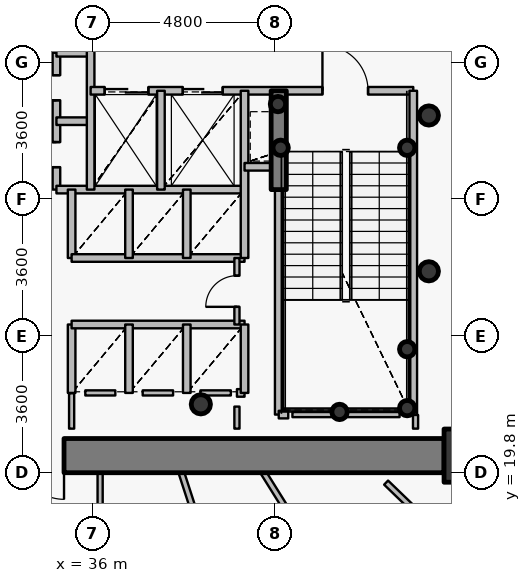
"""IFC4 building model, lengths in metres.
Left out: names, types, materials, properties, quantities, classifications, styles, units other than length and angle.
Written with IfcOpenShell. Run it as: python <this file> out.ifc"""

import sys

from ifc_helpers import new_model, si_unit, direction, frame, frame_2d, origin, origin_2d, place, context, subcontext, project, spatial, rectangle, hollow_circle, extrude, source, transform, mapped, element, fill, save


model = new_model("IFC4")
c1 = context("Model", 3, precision=1e-05, world=origin(), true_north=direction((0.0, 1.0)))
c2 = subcontext(c1, "Body", "Model", "MODEL_VIEW")
j1 = project(units=[si_unit("LENGTHUNIT", "METRE"), si_unit("PLANEANGLEUNIT", "RADIAN")], contexts=[c1])
p1 = place(None, origin())
s1 = spatial("IfcSite", under=j1, at=p1, CompositionType="ELEMENT")
p2 = place(p1, origin())
s2 = spatial("IfcBuilding", under=s1, at=p2, CompositionType="ELEMENT")
p3 = place(p2, frame((0.0, 0.0, 6.0)))
s3 = spatial("IfcBuildingStorey", under=s2, at=p3, CompositionType="ELEMENT", Elevation=6.0)
p4 = place(p3, frame((45.95, 20.25, 0.0), z_axis=(0.0, 0.0, 1.0), x_axis=(1.0, 0.0, 0.0)))
e1 = element("IfcColumn", 1, at=p4, inside=s3, PredefinedType="COLUMN", context=c2, shape_type="SweptSolid", body=[
    extrude(rectangle(XDim=1.4, YDim=1.4, at=origin_2d()), origin(), (0.0, 0.0, 1.0), 4.2),
])
p5 = place(p3, frame((38.85, 21.6, 0.0), z_axis=(0.0, 0.0, 1.0), x_axis=(1.0, 0.0, 0.0)))
e2 = element("IfcColumn", 2, at=p5, inside=s3, PredefinedType="COLUMN", context=c2, shape_type="SweptSolid", body=[
    extrude(hollow_circle(Radius=0.254, WallThickness=0.02, at=origin_2d()), origin(), (0.0, 0.0, 1.0), 4.2),
])
for number, where, z_axis, x_axis in (
    (3, (44.28, 21.5, 0.0), (0.0, 0.0, 1.0), (1.0, 0.0, 0.0)),
    (4, (44.28, 23.05, 0.0), (0.0, 0.0, 1.0), (1.0, 0.0, 0.0)),
    (5, (42.5, 21.4, 0.0), (0.0, 0.0, 1.0), (1.0, 0.0, 0.0)),
    (6, (40.95, 28.35, 0.0), (0.0, 0.0, 1.0), (1.0, 0.0, 0.0)),
    (7, (44.28, 28.35, 0.0), (0.0, 0.0, 1.0), (1.0, 0.0, 0.0)),
    (8, (40.88, 29.5, 0.0), (0.0, 0.0, 1.0), (1.0, 0.0, 0.0)),
):
    element("IfcColumn", number, at=place(p3, frame(where, z_axis=z_axis, x_axis=x_axis)), inside=s3, PredefinedType="COLUMN", context=c2, shape_type="SweptSolid", body=[
        extrude(hollow_circle(Radius=0.203, WallThickness=0.016, at=origin_2d()), origin(), (0.0, 0.0, 1.0), 4.2),
    ])
p6 = place(p3, frame((45.25, 20.25, 0.0), z_axis=(0.0, 0.0, 1.0), x_axis=(-1.0, 0.0, 0.0)))
e9 = element("IfcWall", 9, at=p6, inside=s3, PredefinedType="SHEAR", context=c2, shape_type="SweptSolid", body=[
    extrude(rectangle(XDim=18.5, YDim=0.9, at=frame_2d((9.25, 0.0))), origin(), (0.0, 0.0, 1.0), 3.35),
])
p7 = place(p6, frame((10.0, 0.0, 0.0)))
e10 = element("IfcOpeningElement", 10, at=p7, cuts=e9, PredefinedType="OPENING", context=c2, shape_type="SweptSolid", body=[
    extrude(rectangle(XDim=1.15, YDim=2.15, at=origin_2d()), frame((0.575, 0.46, 1.075), z_axis=(0.0, -1.0, 0.0), x_axis=(1.0, 0.0, 0.0)), (0.0, 0.0, 1.0), 0.92),
])
p8 = place(p3, frame((40.9, 27.25, 0.0), z_axis=(0.0, 0.0, 1.0), x_axis=(0.0, 1.0, 0.0)))
e11 = element("IfcWall", 11, at=p8, inside=s3, PredefinedType="SHEAR", context=c2, shape_type="SweptSolid", body=[
    extrude(rectangle(XDim=2.6, YDim=0.4, at=frame_2d((1.3, 0.0))), origin(), (0.0, 0.0, 1.0), 3.5),
])
for number, where, z_axis, x_axis in (
    (12, (44.85, 25.1, 0.0), (0.0, 0.0, 1.0), (1.0, 0.0, 0.0)),
    (13, (44.85, 29.2, 0.0), (0.0, 0.0, 1.0), (1.0, 0.0, 0.0)),
):
    element("IfcColumn", number, at=place(p3, frame(where, z_axis=z_axis, x_axis=x_axis)), inside=s3, PredefinedType="COLUMN", context=c2, shape_type="SweptSolid", body=[
        extrude(hollow_circle(Radius=0.254, WallThickness=0.02, at=origin_2d()), origin(), (0.0, 0.0, 1.0), 4.2),
    ])
p9 = place(p3, frame((35.05, 27.25, 0.0), z_axis=(0.0, 0.0, 1.0), x_axis=(0.0, 1.0, 0.0)))
e14 = element("IfcWall", 14, at=p9, inside=s3, PredefinedType="PARTITIONING", context=c2, shape_type="SweptSolid", body=[
    extrude(rectangle(XDim=3.6, YDim=0.2, at=frame_2d((1.8, 0.0))), origin(), (0.0, 0.0, 1.0), 3.9),
])
p10 = place(p9, frame((0.59, 0.0, 0.0)))
e15 = element("IfcOpeningElement", 15, at=p10, cuts=e14, PredefinedType="OPENING", context=c2, shape_type="SweptSolid", body=[
    extrude(rectangle(XDim=0.66, YDim=2.05, at=origin_2d()), frame((0.33, 0.11, 1.025), z_axis=(0.0, -1.0, 0.0), x_axis=(1.0, 0.0, 0.0)), (0.0, 0.0, 1.0), 0.22),
])
p11 = place(p9, frame((2.35, 0.0, 0.0)))
e16 = element("IfcOpeningElement", 16, at=p11, cuts=e14, PredefinedType="OPENING", context=c2, shape_type="SweptSolid", body=[
    extrude(rectangle(XDim=0.66, YDim=2.05, at=origin_2d()), frame((0.33, 0.11, 1.025), z_axis=(0.0, -1.0, 0.0), x_axis=(1.0, 0.0, 0.0)), (0.0, 0.0, 1.0), 0.22),
])
p12 = place(p3, frame((35.05, 27.25, 0.0), z_axis=(0.0, 0.0, 1.0), x_axis=(1.0, 0.0, 0.0)))
e17 = element("IfcWall", 17, at=p12, inside=s3, PredefinedType="PARTITIONING", context=c2, shape_type="SweptSolid", body=[
    extrude(rectangle(XDim=4.95, YDim=0.2, at=frame_2d((2.475, 0.0))), origin(), (0.0, 0.0, 1.0), 3.485),
])
for number, where, z_axis, x_axis in (
    (18, (35.05, 29.05, 0.0), (0.0, 0.0, 1.0), (1.0, 0.0, 0.0)),
    (19, (35.05, 30.85, 0.0), (0.0, 0.0, 1.0), (1.0, 0.0, 0.0)),
):
    element("IfcWall", number, at=place(p3, frame(where, z_axis=z_axis, x_axis=x_axis)), inside=s3, PredefinedType="PARTITIONING", context=c2, shape_type="SweptSolid", body=[
        extrude(rectangle(XDim=0.9, YDim=0.2, at=frame_2d((0.45, 0.0))), origin(), (0.0, 0.0, 1.0), 3.9),
    ])
p13 = place(p3, frame((35.45, 21.9, 0.0), z_axis=(0.0, 0.0, 1.0), x_axis=(0.0, 1.0, 0.0)))
e20 = element("IfcWall", 20, at=p13, inside=s3, PredefinedType="PARTITIONING", context=c2, shape_type="SweptSolid", body=[
    extrude(rectangle(XDim=1.8, YDim=0.2, at=frame_2d((0.9, 0.0))), origin(), (0.0, 0.0, 1.0), 3.9),
])
p14 = place(p3, frame((35.45, 23.7, 0.0), z_axis=(0.0, 0.0, 1.0), x_axis=(1.0, 0.0, 0.0)))
e21 = element("IfcWall", 21, at=p14, inside=s3, PredefinedType="PARTITIONING", context=c2, shape_type="SweptSolid", body=[
    extrude(rectangle(XDim=4.55, YDim=0.2, at=frame_2d((2.275, 0.0))), origin(), (0.0, 0.0, 1.0), 3.485),
])
p15 = place(p3, frame((35.45, 25.45, 0.0), z_axis=(0.0, 0.0, 1.0), x_axis=(0.0, 1.0, 0.0)))
e22 = element("IfcWall", 22, at=p15, inside=s3, PredefinedType="PARTITIONING", context=c2, shape_type="SweptSolid", body=[
    extrude(rectangle(XDim=1.8, YDim=0.2, at=frame_2d((0.9, 0.0))), origin(), (0.0, 0.0, 1.0), 3.9),
])
p16 = place(p3, frame((35.45, 25.45, 0.0), z_axis=(0.0, 0.0, 1.0), x_axis=(1.0, 0.0, 0.0)))
e23 = element("IfcWall", 23, at=p16, inside=s3, PredefinedType="PARTITIONING", context=c2, shape_type="SweptSolid", body=[
    extrude(rectangle(XDim=4.55, YDim=0.2, at=frame_2d((2.275, 0.0))), origin(), (0.0, 0.0, 1.0), 3.485),
])
p17 = place(p3, frame((35.95, 27.25, 0.0), z_axis=(0.0, 0.0, 1.0), x_axis=(0.0, 1.0, 0.0)))
e24 = element("IfcWall", 24, at=p17, inside=s3, PredefinedType="PARTITIONING", context=c2, shape_type="SweptSolid", body=[
    extrude(rectangle(XDim=3.8, YDim=0.2, at=frame_2d((1.9, 0.0))), origin(), (0.0, 0.0, 1.0), 3.9),
])
p18 = place(p3, frame((35.95, 29.85, 0.0), z_axis=(0.0, 0.0, 1.0), x_axis=(1.0, 0.0, 0.0)))
e25 = element("IfcWall", 25, at=p18, inside=s3, PredefinedType="PARTITIONING", context=c2, shape_type="SweptSolid", body=[
    extrude(rectangle(XDim=8.49, YDim=0.2, at=frame_2d((4.245, 0.0))), origin(), (0.0, 0.0, 1.0), 3.485),
])
p19 = place(p18, frame((6.1, 0.0, 0.0)))
e26 = element("IfcOpeningElement", 26, at=p19, cuts=e25, PredefinedType="OPENING", context=c2, shape_type="SweptSolid", body=[
    extrude(rectangle(XDim=1.2, YDim=2.15, at=origin_2d()), frame((0.6, 0.11, 1.075), z_axis=(0.0, -1.0, 0.0), x_axis=(1.0, 0.0, 0.0)), (0.0, 0.0, 1.0), 0.22),
])
p20 = place(p18, frame((0.37, 0.0, 0.0)))
e27 = element("IfcOpeningElement", 27, at=p20, cuts=e25, PredefinedType="OPENING", context=c2, shape_type="SweptSolid", body=[
    extrude(rectangle(XDim=1.15, YDim=2.15, at=origin_2d()), frame((0.575, 0.11, 1.075), z_axis=(0.0, -1.0, 0.0), x_axis=(1.0, 0.0, 0.0)), (0.0, 0.0, 1.0), 0.22),
])
p21 = place(p18, frame((2.425, 0.0, 0.0)))
e28 = element("IfcOpeningElement", 28, at=p21, cuts=e25, PredefinedType="OPENING", context=c2, shape_type="SweptSolid", body=[
    extrude(rectangle(XDim=1.05, YDim=2.15, at=origin_2d()), frame((0.525, 0.11, 1.075), z_axis=(0.0, -1.0, 0.0), x_axis=(1.0, 0.0, 0.0)), (0.0, 0.0, 1.0), 0.22),
])
p22 = place(p3, frame((36.2, 17.9, 0.0), z_axis=(0.0, 0.0, 1.0), x_axis=(0.0, 1.0, 0.0)))
e29 = element("IfcWall", 29, at=p22, inside=s3, PredefinedType="PARTITIONING", context=c2, shape_type="SweptSolid", body=[
    extrude(rectangle(XDim=1.9, YDim=0.135, at=frame_2d((0.95, 0.0))), origin(), (0.0, 0.0, 1.0), 3.085),
])
for number, where, z_axis, x_axis in (
    (30, (36.96, 21.9, 0.0), (0.0, 0.0, 1.0), (0.0, 1.0, 0.0)),
    (31, (36.96, 25.45, 0.0), (0.0, 0.0, 1.0), (0.0, 1.0, 0.0)),
):
    element("IfcWall", number, at=place(p3, frame(where, z_axis=z_axis, x_axis=x_axis)), inside=s3, PredefinedType="PARTITIONING", context=c2, shape_type="SweptSolid", body=[
        extrude(rectangle(XDim=1.8, YDim=0.2, at=frame_2d((0.9, 0.0))), origin(), (0.0, 0.0, 1.0), 3.9),
    ])
p23 = place(p3, frame((37.8, 27.25, 0.0), z_axis=(0.0, 0.0, 1.0), x_axis=(0.0, 1.0, 0.0)))
e32 = element("IfcWall", 32, at=p23, inside=s3, PredefinedType="PARTITIONING", context=c2, shape_type="SweptSolid", body=[
    extrude(rectangle(XDim=2.6, YDim=0.2, at=frame_2d((1.3, 0.0))), origin(), (0.0, 0.0, 1.0), 3.9),
])
p24 = place(p3, frame((38.339, 19.8, 0.0), z_axis=(0.0, 0.0, 1.0), x_axis=(0.309020911431, -0.951055243557, 0.0)))
e33 = element("IfcWall", 33, at=p24, inside=s3, PredefinedType="PARTITIONING", context=c2, shape_type="SweptSolid", body=[
    extrude(rectangle(XDim=18.723, YDim=0.15, at=frame_2d((9.362, 0.0))), origin(), (0.0, 0.0, 1.0), 3.285),
])
p25 = place(p24, frame((4.76, 0.0, 0.0)))
e34 = element("IfcOpeningElement", 34, at=p25, cuts=e33, PredefinedType="OPENING", context=c2, shape_type="SweptSolid", body=[
    extrude(rectangle(XDim=0.82, YDim=2.1, at=origin_2d()), frame((0.41, 0.085, 1.05), z_axis=(0.0, -1.0, 0.0), x_axis=(1.0, 0.0, 0.0)), (0.0, 0.0, 1.0), 0.17),
])
p26 = place(p24, frame((13.966, 0.0, 0.0)))
e35 = element("IfcOpeningElement", 35, at=p26, cuts=e33, PredefinedType="OPENING", context=c2, shape_type="SweptSolid", body=[
    extrude(rectangle(XDim=1.05, YDim=2.15, at=origin_2d()), frame((0.525, 0.085, 1.075), z_axis=(0.0, -1.0, 0.0), x_axis=(1.0, 0.0, 0.0)), (0.0, 0.0, 1.0), 0.17),
])
for number, where, z_axis, x_axis in (
    (36, (38.48, 21.9, 0.0), (0.0, 0.0, 1.0), (0.0, 1.0, 0.0)),
    (37, (38.48, 25.45, 0.0), (0.0, 0.0, 1.0), (0.0, 1.0, 0.0)),
):
    element("IfcWall", number, at=place(p3, frame(where, z_axis=z_axis, x_axis=x_axis)), inside=s3, PredefinedType="PARTITIONING", context=c2, shape_type="SweptSolid", body=[
        extrude(rectangle(XDim=1.8, YDim=0.2, at=frame_2d((0.9, 0.0))), origin(), (0.0, 0.0, 1.0), 3.9),
    ])
p27 = place(p3, frame((39.8, 21.9, 0.0), z_axis=(0.0, 0.0, 1.0), x_axis=(1.0, 0.0, 0.0)))
e38 = element("IfcWall", 38, at=p27, inside=s3, PredefinedType="PARTITIONING", context=c2, shape_type="SweptSolid", body=[
    extrude(rectangle(XDim=0.2, YDim=0.2, at=frame_2d((0.1, 0.0))), origin(), (0.0, 0.0, 1.0), 3.9),
])
p28 = place(p3, frame((39.8, 23.7, 0.0), z_axis=(0.0, 0.0, 1.0), x_axis=(0.0, 1.0, 0.0)))
e39 = element("IfcWall", 39, at=p28, inside=s3, PredefinedType="PARTITIONING", context=c2, shape_type="SweptSolid", body=[
    extrude(rectangle(XDim=1.75, YDim=0.135, at=frame_2d((0.875, 0.0))), origin(), (0.0, 0.0, 1.0), 3.9),
])
p29 = place(p28, frame((0.465, 0.0, 0.0)))
e40 = element("IfcOpeningElement", 40, at=p29, cuts=e39, PredefinedType="OPENING", context=c2, shape_type="SweptSolid", body=[
    extrude(rectangle(XDim=0.82, YDim=2.1, at=origin_2d()), frame((0.41, 0.078, 1.05), z_axis=(0.0, -1.0, 0.0), x_axis=(1.0, 0.0, 0.0)), (0.0, 0.0, 1.0), 0.155),
])
p30 = place(p3, frame((40.0, 21.9, 0.0), z_axis=(0.0, 0.0, 1.0), x_axis=(0.0, 1.0, 0.0)))
e41 = element("IfcWall", 41, at=p30, inside=s3, PredefinedType="PARTITIONING", context=c2, shape_type="SweptSolid", body=[
    extrude(rectangle(XDim=1.8, YDim=0.2, at=frame_2d((0.9, 0.0))), origin(), (0.0, 0.0, 1.0), 3.9),
])
p31 = place(p3, frame((40.0, 25.45, 0.0), z_axis=(0.0, 0.0, 1.0), x_axis=(0.0, 1.0, 0.0)))
e42 = element("IfcWall", 42, at=p31, inside=s3, PredefinedType="PARTITIONING", context=c2, shape_type="SweptSolid", body=[
    extrude(rectangle(XDim=4.4, YDim=0.2, at=frame_2d((2.2, 0.0))), origin(), (0.0, 0.0, 1.0), 3.9),
])
p32 = place(p3, frame((40.0, 27.85, 0.0), z_axis=(0.0, 0.0, 1.0), x_axis=(1.0, 0.0, 0.0)))
e43 = element("IfcWall", 43, at=p32, inside=s3, PredefinedType="PARTITIONING", context=c2, shape_type="SweptSolid", body=[
    extrude(rectangle(XDim=0.9, YDim=0.2, at=frame_2d((0.45, 0.0))), origin(), (0.0, 0.0, 1.0), 3.9),
])
p33 = place(p3, frame((40.499, 19.8, 0.0), z_axis=(0.0, 0.0, 1.0), x_axis=(0.529919953547, -0.848047665425, 0.0)))
e44 = element("IfcWall", 44, at=p33, inside=s3, PredefinedType="PARTITIONING", context=c2, shape_type="SweptSolid", body=[
    extrude(rectangle(XDim=18.893, YDim=0.15, at=frame_2d((9.447, 0.0))), origin(), (0.0, 0.0, 1.0), 3.285),
])
p34 = place(p33, frame((13.906, 0.0, 0.0)))
e45 = element("IfcOpeningElement", 45, at=p34, cuts=e44, PredefinedType="OPENING", context=c2, shape_type="SweptSolid", body=[
    extrude(rectangle(XDim=1.05, YDim=2.15, at=origin_2d()), frame((0.525, 0.085, 1.075), z_axis=(0.0, -1.0, 0.0), x_axis=(1.0, 0.0, 0.0)), (0.0, 0.0, 1.0), 0.17),
])
p35 = place(p3, frame((40.9, 21.33, 0.0), z_axis=(0.0, 0.0, 1.0), x_axis=(0.0, 1.0, 0.0)))
e46 = element("IfcWall", 46, at=p35, inside=s3, PredefinedType="PARTITIONING", context=c2, shape_type="SweptSolid", body=[
    extrude(rectangle(XDim=5.91, YDim=0.2, at=frame_2d((2.955, 0.0))), origin(), (0.0, 0.0, 1.0), 3.435),
])
p36 = place(p3, frame((40.9, 21.33, 0.0), z_axis=(0.0, 0.0, 1.0), x_axis=(1.0, 0.0, 0.0)))
e47 = element("IfcWall", 47, at=p36, inside=s3, PredefinedType="PARTITIONING", context=c2, shape_type="SweptSolid", body=[
    extrude(rectangle(XDim=0.25, YDim=0.2, at=frame_2d((0.125, 0.0))), origin(), (0.0, 0.0, 1.0), 3.435),
])
p37 = place(p3, frame((44.44, 21.33, 0.0), z_axis=(0.0, 0.0, 1.0), x_axis=(0.0, 1.0, 0.0)))
e48 = element("IfcWall", 48, at=p37, inside=s3, PredefinedType="PARTITIONING", context=c2, shape_type="SweptSolid", body=[
    extrude(rectangle(XDim=8.52, YDim=0.2, at=frame_2d((4.26, 0.0))), origin(), (0.0, 0.0, 1.0), 3.9),
])
p38 = place(p3, frame((44.08, 21.33, 0.0), z_axis=(0.0, 0.0, 1.0), x_axis=(-1.0, 0.0, 0.0)))
e49 = element("IfcWall", 49, at=p38, inside=s3, PredefinedType="PARTITIONING", context=c2, shape_type="SweptSolid", body=[
    extrude(rectangle(XDim=2.82, YDim=0.135, at=frame_2d((1.41, 0.0))), origin(), (0.0, 0.0, 1.0), 3.435),
])
p39 = place(p3, frame((36.6, 21.9, 0.0), z_axis=(0.0, 0.0, 1.0), x_axis=(-1.0, 0.0, 0.0)))
e50 = element("IfcWall", 50, at=p39, inside=s3, PredefinedType="PARTITIONING", context=c2, shape_type="SweptSolid", body=[
    extrude(rectangle(XDim=0.79, YDim=0.135, at=frame_2d((0.395, 0.0))), origin(), (0.0, 0.0, 1.0), 3.9),
])
p40 = place(p3, frame((38.12, 21.9, 0.0), z_axis=(0.0, 0.0, 1.0), x_axis=(-1.0, 0.0, 0.0)))
e51 = element("IfcWall", 51, at=p40, inside=s3, PredefinedType="PARTITIONING", context=c2, shape_type="SweptSolid", body=[
    extrude(rectangle(XDim=0.8, YDim=0.135, at=frame_2d((0.4, 0.0))), origin(), (0.0, 0.0, 1.0), 3.9),
])
p41 = place(p3, frame((39.64, 21.9, 0.0), z_axis=(0.0, 0.0, 1.0), x_axis=(-1.0, 0.0, 0.0)))
e52 = element("IfcWall", 52, at=p41, inside=s3, PredefinedType="PARTITIONING", context=c2, shape_type="SweptSolid", body=[
    extrude(rectangle(XDim=0.8, YDim=0.135, at=frame_2d((0.4, 0.0))), origin(), (0.0, 0.0, 1.0), 3.485),
])
p42 = place(p3, frame((39.8, 20.96, 0.0), z_axis=(0.0, 0.0, 1.0), x_axis=(0.0, 1.0, 0.0)))
e53 = element("IfcWall", 53, at=p42, inside=s3, PredefinedType="PARTITIONING", context=c2, shape_type="SweptSolid", body=[
    extrude(rectangle(XDim=0.58, YDim=0.135, at=frame_2d((0.29, 0.0))), origin(), (0.0, 0.0, 1.0), 3.435),
])
p43 = place(p3, frame((44.5, 20.96, 0.0), z_axis=(0.0, 0.0, 1.0), x_axis=(0.0, 1.0, 0.0)))
e54 = element("IfcWall", 54, at=p43, inside=s3, PredefinedType="PARTITIONING", context=c2, shape_type="SweptSolid", body=[
    extrude(rectangle(XDim=0.36, YDim=0.135, at=frame_2d((0.18, 0.0))), origin(), (0.0, 0.0, 1.0), 3.9),
])
p44 = place(p3, frame((35.45, 21.89, 0.0), z_axis=(0.0, 0.0, 1.0), x_axis=(0.0, -1.0, 0.0)))
e55 = element("IfcWall", 55, at=p44, inside=s3, PredefinedType="PARTITIONING", context=c2, shape_type="SweptSolid", body=[
    extrude(rectangle(XDim=0.93, YDim=0.135, at=frame_2d((0.465, 0.0))), origin(), (0.0, 0.0, 1.0), 3.485),
])
p45 = place(p3, frame((43.725, 19.54, 0.0), z_axis=(0.0, 0.0, 1.0), x_axis=(0.719317456081, -0.69468150787, 0.0)))
e56 = element("IfcWall", 56, at=p45, inside=s3, PredefinedType="PARTITIONING", context=c2, shape_type="SweptSolid", body=[
    extrude(rectangle(XDim=2.804, YDim=0.15, at=frame_2d((1.402, 0.0))), origin(), (0.0, 0.0, 1.0), 3.9),
])
m1 = source(origin(), c2, "Body", "SweptSolid", [
    extrude(rectangle(XDim=1.15, YDim=2.15, at=origin_2d()), frame((0.575, 0.025, 1.075), z_axis=(0.0, -1.0, 0.0), x_axis=(1.0, 0.0, 0.0)), (0.0, 0.0, 1.0), 0.05),
])
p46 = place(p7, origin())
e57 = element("IfcDoor", 57, at=p46, inside=s3, OperationType="SINGLE_SWING_LEFT", PredefinedType="DOOR", context=c2, shape_type="MappedRepresentation", body=[
    mapped(m1, transform((0.0, 0.0, 0.0), x_axis=(1.0, 0.0, 0.0), y_axis=(0.0, 1.0, 0.0), z_axis=(0.0, 0.0, 1.0), scale=1.0)),
])
fill(e10, e57)
m2 = source(origin(), c2, "Body", "SweptSolid", [
    extrude(rectangle(XDim=1.2, YDim=2.15, at=origin_2d()), frame((0.6, 0.025, 1.075), z_axis=(0.0, -1.0, 0.0), x_axis=(1.0, 0.0, 0.0)), (0.0, 0.0, 1.0), 0.05),
])
p47 = place(p19, origin())
e58 = element("IfcDoor", 58, at=p47, inside=s3, OperationType="SINGLE_SWING_LEFT", PredefinedType="DOOR", context=c2, shape_type="MappedRepresentation", body=[
    mapped(m2, transform((0.0, 0.0, 0.0), x_axis=(1.0, 0.0, 0.0), y_axis=(0.0, 1.0, 0.0), z_axis=(0.0, 0.0, 1.0), scale=1.0)),
])
fill(e26, e58)
m3 = source(origin(), c2, "Body", "SweptSolid", [
    extrude(rectangle(XDim=1.15, YDim=2.15, at=origin_2d()), frame((0.575, 0.025, 1.075), z_axis=(0.0, -1.0, 0.0), x_axis=(1.0, 0.0, 0.0)), (0.0, 0.0, 1.0), 0.05),
])
p48 = place(p20, origin())
e59 = element("IfcDoor", 59, at=p48, inside=s3, OperationType="DOUBLE_DOOR_SLIDING", PredefinedType="USERDEFINED", context=c2, shape_type="MappedRepresentation", body=[
    mapped(m3, transform((0.0, 0.0, 0.0), x_axis=(1.0, 0.0, 0.0), y_axis=(0.0, 1.0, 0.0), z_axis=(0.0, 0.0, 1.0), scale=1.0)),
])
fill(e27, e59)
m4 = source(origin(), c2, "Body", "SweptSolid", [
    extrude(rectangle(XDim=1.05, YDim=2.15, at=origin_2d()), frame((0.525, 0.025, 1.075), z_axis=(0.0, -1.0, 0.0), x_axis=(1.0, 0.0, 0.0)), (0.0, 0.0, 1.0), 0.05),
])
p49 = place(p21, origin())
e60 = element("IfcDoor", 60, at=p49, inside=s3, OperationType="DOUBLE_DOOR_SLIDING", PredefinedType="USERDEFINED", context=c2, shape_type="MappedRepresentation", body=[
    mapped(m4, transform((0.0, 0.0, 0.0), x_axis=(1.0, 0.0, 0.0), y_axis=(0.0, 1.0, 0.0), z_axis=(0.0, 0.0, 1.0), scale=1.0)),
])
fill(e28, e60)
m5 = source(origin(), c2, "Body", "SweptSolid", [
    extrude(rectangle(XDim=0.66, YDim=2.05, at=origin_2d()), frame((0.33, 0.025, 1.025), z_axis=(0.0, -1.0, 0.0), x_axis=(1.0, 0.0, 0.0)), (0.0, 0.0, 1.0), 0.05),
])
p50 = place(p10, origin())
e61 = element("IfcDoor", 61, at=p50, inside=s3, OperationType="SINGLE_SWING_RIGHT", PredefinedType="USERDEFINED", context=c2, shape_type="MappedRepresentation", body=[
    mapped(m5, transform((0.0, 0.0, 0.0), x_axis=(1.0, 0.0, 0.0), y_axis=(0.0, 1.0, 0.0), z_axis=(0.0, 0.0, 1.0), scale=1.0)),
])
fill(e15, e61)
p51 = place(p11, origin())
e62 = element("IfcDoor", 62, at=p51, inside=s3, OperationType="SINGLE_SWING_LEFT", PredefinedType="USERDEFINED", context=c2, shape_type="MappedRepresentation", body=[
    mapped(m5, transform((0.0, 0.0, 0.0), x_axis=(1.0, 0.0, 0.0), y_axis=(0.0, 1.0, 0.0), z_axis=(0.0, 0.0, 1.0), scale=1.0)),
])
fill(e16, e62)
m6 = source(origin(), c2, "Body", "SweptSolid", [
    extrude(rectangle(XDim=0.82, YDim=2.1, at=origin_2d()), frame((0.41, 0.025, 1.05), z_axis=(0.0, -1.0, 0.0), x_axis=(1.0, 0.0, 0.0)), (0.0, 0.0, 1.0), 0.05),
])
p52 = place(p29, origin())
e63 = element("IfcDoor", 63, at=p52, inside=s3, OperationType="SINGLE_SWING_LEFT", PredefinedType="DOOR", context=c2, shape_type="MappedRepresentation", body=[
    mapped(m6, transform((0.0, 0.0, 0.0), x_axis=(1.0, 0.0, 0.0), y_axis=(0.0, 1.0, 0.0), z_axis=(0.0, 0.0, 1.0), scale=1.0)),
])
fill(e40, e63)
save(model, sys.argv[1])
